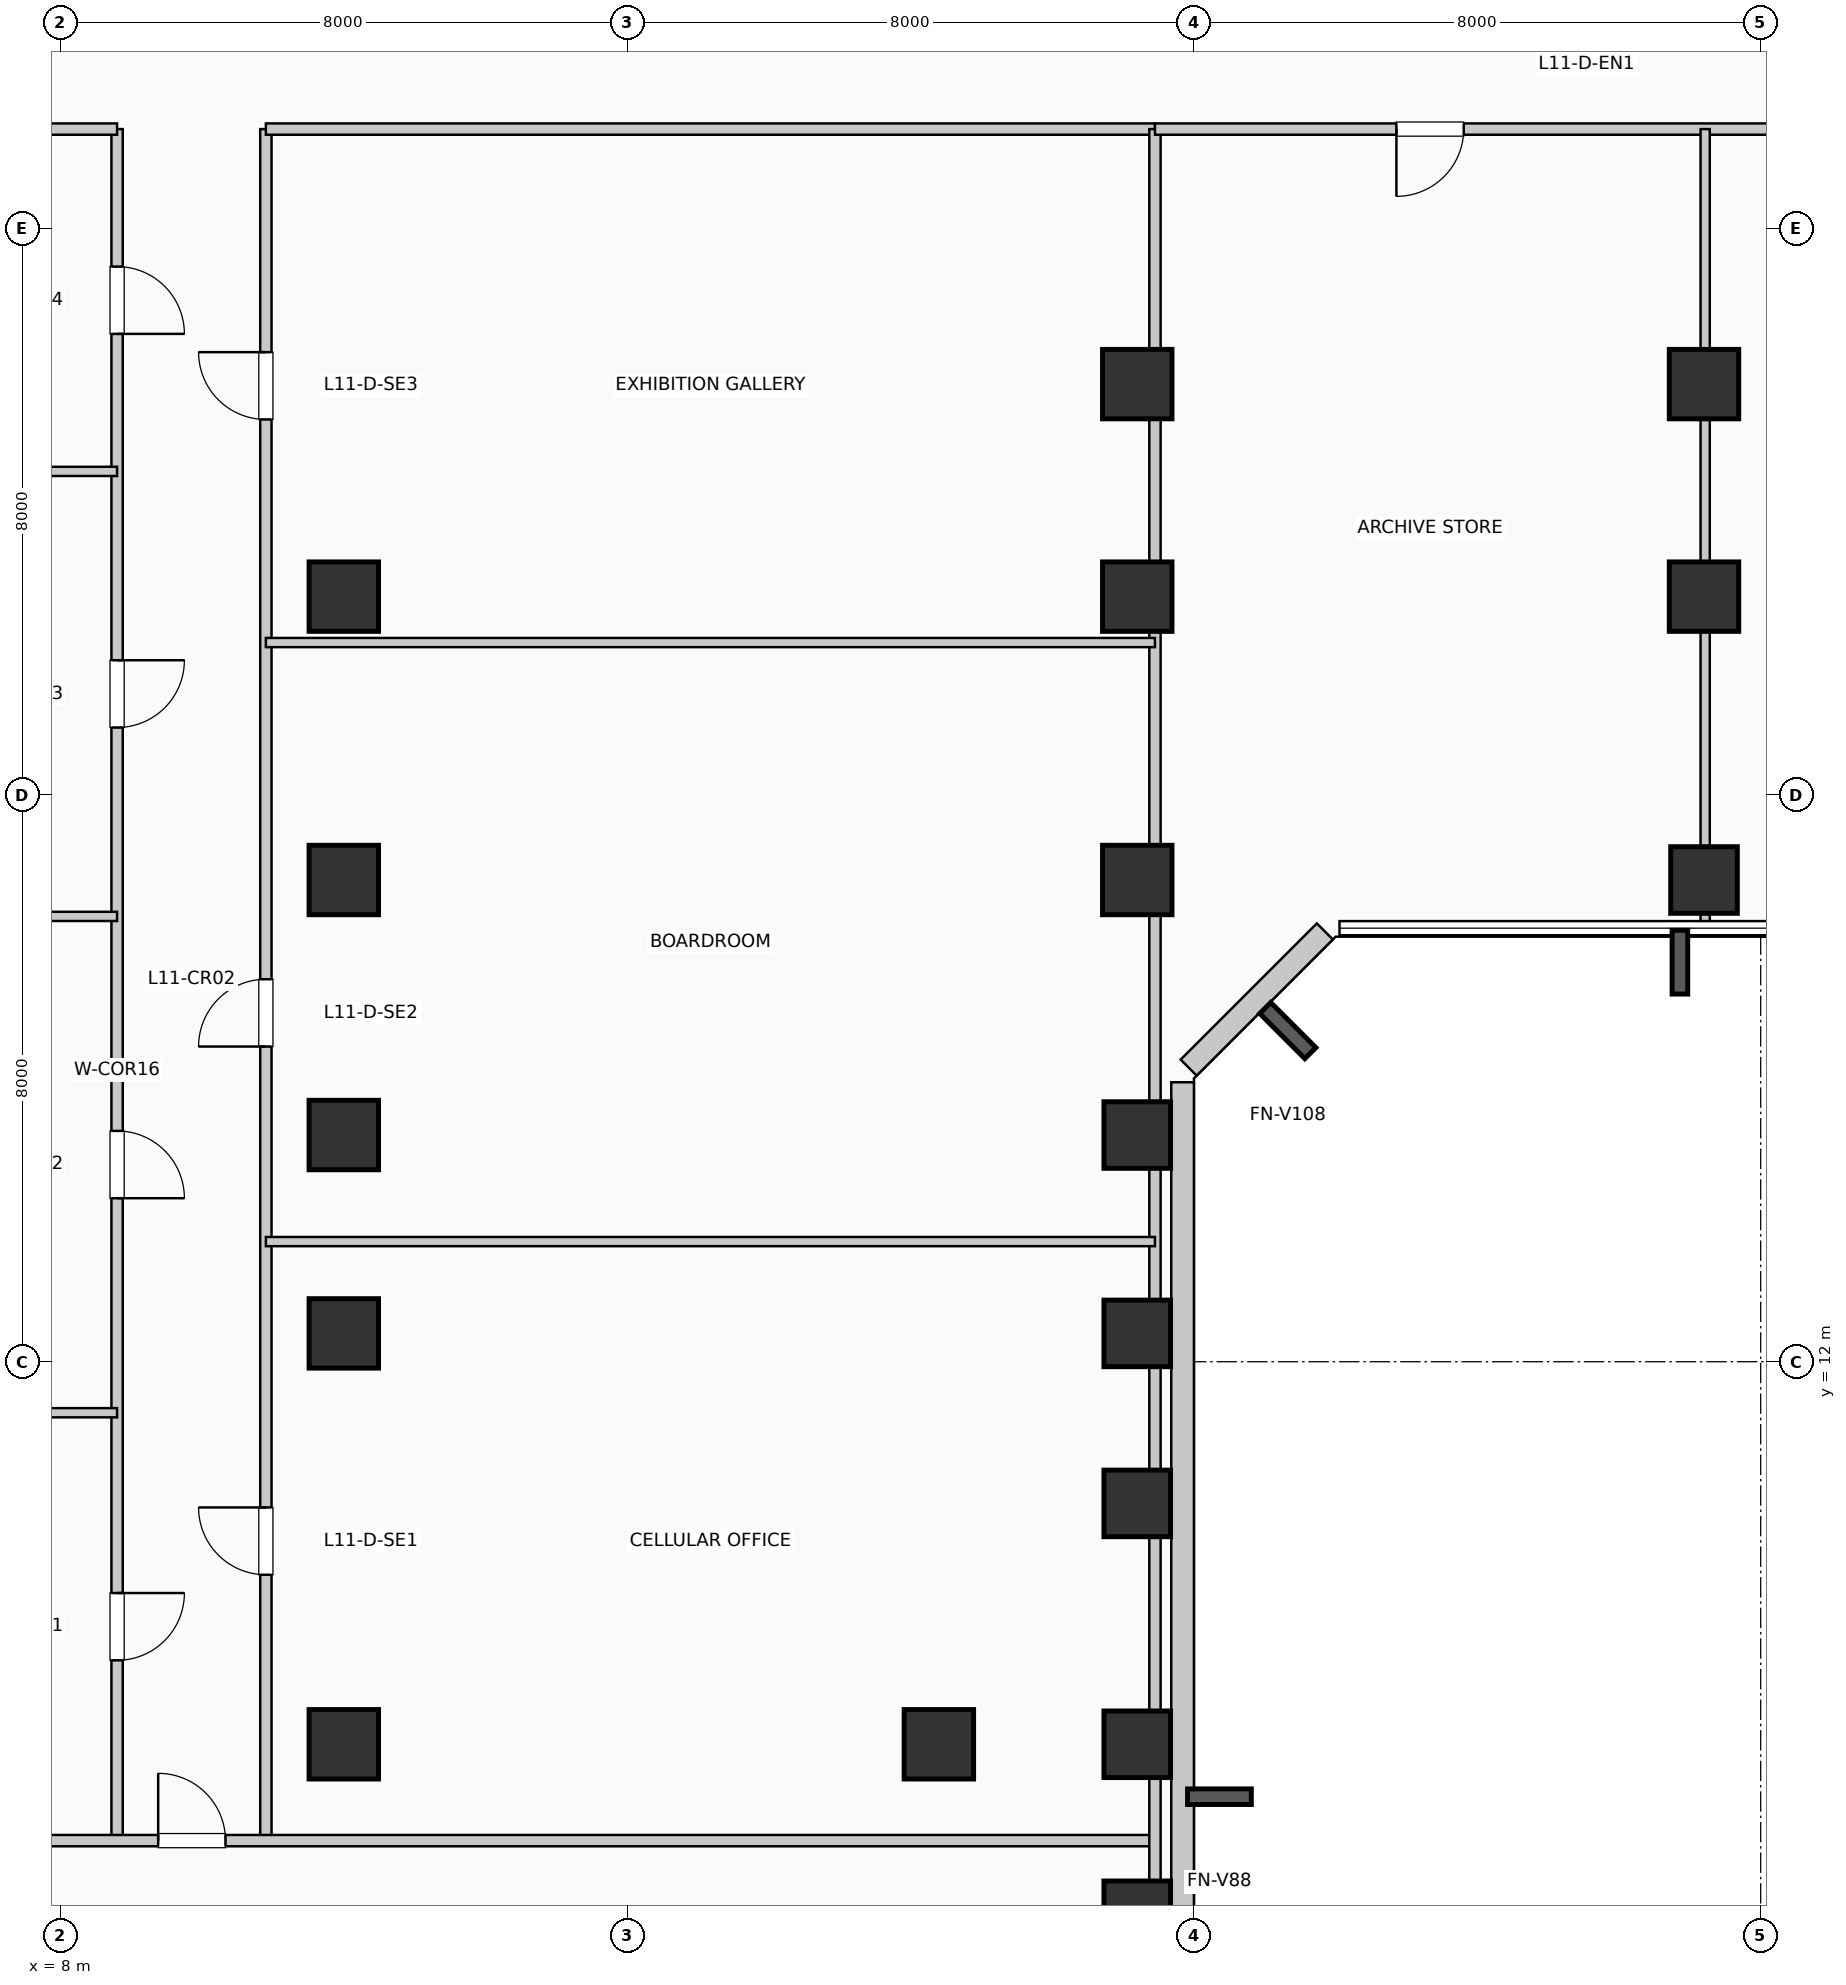
"""IFC4 building model, lengths in metres.
Left out: names, types, materials, properties, quantities, classifications, styles, units other than length and angle.
Written with IfcOpenShell. Run it as: python <this file> out.ifc"""

import sys

from ifc_helpers import new_model, si_unit, direction, frame, frame_2d, origin, origin_2d, place, context, subcontext, project, spatial, rectangle, extrude, element, fill, save


model = new_model("IFC4")
c1 = context("Model", 3, precision=1e-05, world=origin(), true_north=direction((0.0, 1.0)))
c2 = subcontext(c1, "Body", "Model", "MODEL_VIEW")
j1 = project(units=[si_unit("LENGTHUNIT", "METRE"), si_unit("PLANEANGLEUNIT", "RADIAN")], contexts=[c1])
p1 = place(None, origin())
s1 = spatial("IfcSite", under=j1, at=p1, CompositionType="ELEMENT")
p2 = place(p1, origin())
s2 = spatial("IfcBuilding", under=s1, at=p2, CompositionType="ELEMENT")
p3 = place(p2, frame((0.0, 0.0, 50.16)))
s3 = spatial("IfcBuildingStorey", under=s2, at=p3, CompositionType="ELEMENT", Elevation=50.16)
for number, where, z_axis, x_axis in (
    (1, (12.0, 6.6, 0.0), (0.0, 0.0, 1.0), (1.0, 0.0, 0.0)),
    (2, (12.0, 12.4, 0.0), (0.0, 0.0, 1.0), (1.0, 0.0, 0.0)),
    (3, (12.0, 15.2, 0.0), (0.0, 0.0, 1.0), (1.0, 0.0, 0.0)),
    (4, (12.0, 18.8, 0.0), (0.0, 0.0, 1.0), (1.0, 0.0, 0.0)),
    (5, (12.0, 22.8, 0.0), (0.0, 0.0, 1.0), (1.0, 0.0, 0.0)),
    (6, (20.4, 6.6, 0.0), (0.0, 0.0, 1.0), (1.0, 0.0, 0.0)),
):
    element("IfcColumn", number, at=place(p3, frame(where, z_axis=z_axis, x_axis=x_axis)), inside=s3, PredefinedType="COLUMN", context=c2, shape_type="SweptSolid", body=[
        extrude(rectangle(XDim=0.98, YDim=0.98, at=origin_2d()), origin(), (0.0, 0.0, 1.0), 3.96),
    ])
for number, where, z_axis, x_axis in (
    (7, (23.2, 4.2, 0.0), (0.0, 0.0, 1.0), (1.0, 0.0, 0.0)),
    (8, (23.2, 6.6, 0.0), (0.0, 0.0, 1.0), (1.0, 0.0, 0.0)),
    (9, (23.2, 10.0, 0.0), (0.0, 0.0, 1.0), (1.0, 0.0, 0.0)),
    (10, (23.2, 12.4, 0.0), (0.0, 0.0, 1.0), (1.0, 0.0, 0.0)),
    (11, (23.2, 15.2, 0.0), (0.0, 0.0, 1.0), (1.0, 0.0, 0.0)),
):
    element("IfcColumn", number, at=place(p3, frame(where, z_axis=z_axis, x_axis=x_axis)), inside=s3, PredefinedType="COLUMN", context=c2, shape_type="SweptSolid", body=[
        extrude(rectangle(XDim=0.94, YDim=0.94, at=origin_2d()), origin(), (0.0, 0.0, 1.0), 3.96),
    ])
for number, where, z_axis, x_axis in (
    (12, (23.2, 18.8, 0.0), (0.0, 0.0, 1.0), (1.0, 0.0, 0.0)),
    (13, (23.2, 22.8, 0.0), (0.0, 0.0, 1.0), (1.0, 0.0, 0.0)),
    (14, (23.2, 25.8, 0.0), (0.0, 0.0, 1.0), (1.0, 0.0, 0.0)),
):
    element("IfcColumn", number, at=place(p3, frame(where, z_axis=z_axis, x_axis=x_axis)), inside=s3, PredefinedType="COLUMN", context=c2, shape_type="SweptSolid", body=[
        extrude(rectangle(XDim=0.98, YDim=0.98, at=origin_2d()), origin(), (0.0, 0.0, 1.0), 3.96),
    ])
p4 = place(p3, frame((31.2, 18.8, 0.0), z_axis=(0.0, 0.0, 1.0), x_axis=(1.0, 0.0, 0.0)))
e15 = element("IfcColumn", 15, at=p4, inside=s3, PredefinedType="COLUMN", context=c2, shape_type="SweptSolid", body=[
    extrude(rectangle(XDim=0.94, YDim=0.94, at=origin_2d()), origin(), (0.0, 0.0, 1.0), 3.96),
])
for number, where, z_axis, x_axis in (
    (16, (31.2, 22.8, 0.0), (0.0, 0.0, 1.0), (1.0, 0.0, 0.0)),
    (17, (31.2, 25.8, 0.0), (0.0, 0.0, 1.0), (1.0, 0.0, 0.0)),
):
    element("IfcColumn", number, at=place(p3, frame(where, z_axis=z_axis, x_axis=x_axis)), inside=s3, PredefinedType="COLUMN", context=c2, shape_type="SweptSolid", body=[
        extrude(rectangle(XDim=0.98, YDim=0.98, at=origin_2d()), origin(), (0.0, 0.0, 1.0), 3.96),
    ])
p5 = place(p3, frame((23.84, 3.055, 0.0), z_axis=(0.0, 0.0, 1.0), x_axis=(0.0, 1.0, 0.0)))
e18 = element("IfcWall", 18, at=p5, inside=s3, PredefinedType="SOLIDWALL", context=c2, shape_type="SweptSolid", body=[
    extrude(rectangle(XDim=12.89, YDim=0.32, at=frame_2d((6.445, 0.0))), origin(), (0.0, 0.0, 1.0), 3.71),
])
p6 = place(p3, frame((23.926, 16.152, 0.0), z_axis=(0.0, 0.0, 1.0), x_axis=(0.707106781187, 0.707106781187, 0.0)))
e19 = element("IfcWall", 19, at=p6, inside=s3, PredefinedType="SOLIDWALL", context=c2, shape_type="SweptSolid", body=[
    extrude(rectangle(XDim=2.718, YDim=0.32, at=frame_2d((1.359, 0.0))), origin(), (0.0, 0.0, 1.0), 3.71),
])
p7 = place(p3, frame((8.8, 5.24, 0.0), z_axis=(0.0, 0.0, 1.0), x_axis=(0.0, 1.0, 0.0)))
e20 = element("IfcWall", 20, at=p7, inside=s3, PredefinedType="PARTITIONING", context=c2, shape_type="SweptSolid", body=[
    extrude(rectangle(XDim=24.16, YDim=0.16, at=frame_2d((12.08, 0.0))), origin(), (0.0, 0.0, 1.0), 3.71),
])
p8 = place(p7, frame((3.495, 0.0, 0.0), z_axis=(0.0, 0.0, 1.0), x_axis=(-1.0, 0.0, 0.0)))
e21 = element("IfcOpeningElement", 21, at=p8, cuts=e20, PredefinedType="OPENING", context=c2, shape_type="SweptSolid", body=[
    extrude(rectangle(XDim=0.95, YDim=2.15, at=frame_2d((0.475, 1.075))), frame((0.0, 0.09, 0.0), z_axis=(0.0, -1.0, 0.0), x_axis=(1.0, 0.0, 0.0)), (0.0, 0.0, 1.0), 0.18),
])
p9 = place(p7, frame((10.018, 0.0, 0.0), z_axis=(0.0, 0.0, 1.0), x_axis=(-1.0, 0.0, 0.0)))
e22 = element("IfcOpeningElement", 22, at=p9, cuts=e20, PredefinedType="OPENING", context=c2, shape_type="SweptSolid", body=[
    extrude(rectangle(XDim=0.95, YDim=2.15, at=frame_2d((0.475, 1.075))), frame((0.0, 0.09, 0.0), z_axis=(0.0, -1.0, 0.0), x_axis=(1.0, 0.0, 0.0)), (0.0, 0.0, 1.0), 0.18),
])
p10 = place(p7, frame((16.662, 0.0, 0.0), z_axis=(0.0, 0.0, 1.0), x_axis=(-1.0, 0.0, 0.0)))
e23 = element("IfcOpeningElement", 23, at=p10, cuts=e20, PredefinedType="OPENING", context=c2, shape_type="SweptSolid", body=[
    extrude(rectangle(XDim=0.95, YDim=2.15, at=frame_2d((0.475, 1.075))), frame((0.0, 0.09, 0.0), z_axis=(0.0, -1.0, 0.0), x_axis=(1.0, 0.0, 0.0)), (0.0, 0.0, 1.0), 0.18),
])
p11 = place(p7, frame((22.219, 0.0, 0.0), z_axis=(0.0, 0.0, 1.0), x_axis=(-1.0, 0.0, 0.0)))
e24 = element("IfcOpeningElement", 24, at=p11, cuts=e20, PredefinedType="OPENING", context=c2, shape_type="SweptSolid", body=[
    extrude(rectangle(XDim=0.95, YDim=2.15, at=frame_2d((0.475, 1.075))), frame((0.0, 0.09, 0.0), z_axis=(0.0, -1.0, 0.0), x_axis=(1.0, 0.0, 0.0)), (0.0, 0.0, 1.0), 0.18),
])
p12 = place(p3, frame((10.9, 5.24, 0.0), z_axis=(0.0, 0.0, 1.0), x_axis=(0.0, 1.0, 0.0)))
e25 = element("IfcWall", 25, at=p12, inside=s3, PredefinedType="PARTITIONING", context=c2, shape_type="SweptSolid", body=[
    extrude(rectangle(XDim=24.16, YDim=0.16, at=frame_2d((12.08, 0.0))), origin(), (0.0, 0.0, 1.0), 3.71),
])
p13 = place(p12, frame((3.753, 0.0, 0.0)))
e26 = element("IfcOpeningElement", 26, at=p13, cuts=e25, PredefinedType="OPENING", context=c2, shape_type="SweptSolid", body=[
    extrude(rectangle(XDim=0.95, YDim=2.15, at=frame_2d((0.475, 1.075))), frame((0.0, 0.09, 0.0), z_axis=(0.0, -1.0, 0.0), x_axis=(1.0, 0.0, 0.0)), (0.0, 0.0, 1.0), 0.18),
])
p14 = place(p12, frame((11.209, 0.0, 0.0)))
e27 = element("IfcOpeningElement", 27, at=p14, cuts=e25, PredefinedType="OPENING", context=c2, shape_type="SweptSolid", body=[
    extrude(rectangle(XDim=0.95, YDim=2.15, at=frame_2d((0.475, 1.075))), frame((0.0, 0.09, 0.0), z_axis=(0.0, -1.0, 0.0), x_axis=(1.0, 0.0, 0.0)), (0.0, 0.0, 1.0), 0.18),
])
p15 = place(p12, frame((20.061, 0.0, 0.0)))
e28 = element("IfcOpeningElement", 28, at=p15, cuts=e25, PredefinedType="OPENING", context=c2, shape_type="SweptSolid", body=[
    extrude(rectangle(XDim=0.95, YDim=2.15, at=frame_2d((0.475, 1.075))), frame((0.0, 0.09, 0.0), z_axis=(0.0, -1.0, 0.0), x_axis=(1.0, 0.0, 0.0)), (0.0, 0.0, 1.0), 0.18),
])
p16 = place(p3, frame((0.19, 5.24, 0.0), z_axis=(0.0, 0.0, 1.0), x_axis=(1.0, 0.0, 0.0)))
e29 = element("IfcWall", 29, at=p16, inside=s3, PredefinedType="PARTITIONING", context=c2, shape_type="SweptSolid", body=[
    extrude(rectangle(XDim=23.26, YDim=0.16, at=frame_2d((11.63, 0.0))), origin(), (0.0, 0.0, 1.0), 3.71),
])
p17 = place(p16, frame((9.19, 0.0, 0.0)))
e30 = element("IfcOpeningElement", 30, at=p17, cuts=e29, PredefinedType="OPENING", context=c2, shape_type="SweptSolid", body=[
    extrude(rectangle(XDim=0.95, YDim=2.15, at=frame_2d((0.475, 1.075))), frame((0.0, 0.09, 0.0), z_axis=(0.0, -1.0, 0.0), x_axis=(1.0, 0.0, 0.0)), (0.0, 0.0, 1.0), 0.18),
])
p18 = place(p3, frame((0.19, 29.4, 0.0), z_axis=(0.0, 0.0, 1.0), x_axis=(1.0, 0.0, 0.0)))
e31 = element("IfcWall", 31, at=p18, inside=s3, PredefinedType="PARTITIONING", context=c2, shape_type="SweptSolid", body=[
    extrude(rectangle(XDim=8.61, YDim=0.16, at=frame_2d((4.305, 0.0))), origin(), (0.0, 0.0, 1.0), 3.365),
])
p19 = place(p3, frame((10.9, 29.4, 0.0), z_axis=(0.0, 0.0, 1.0), x_axis=(1.0, 0.0, 0.0)))
e32 = element("IfcWall", 32, at=p19, inside=s3, PredefinedType="PARTITIONING", context=c2, shape_type="SweptSolid", body=[
    extrude(rectangle(XDim=12.55, YDim=0.16, at=frame_2d((6.275, 0.0))), origin(), (0.0, 0.0, 1.0), 3.365),
])
p20 = place(p3, frame((23.45, 1.04, 0.0), z_axis=(0.0, 0.0, 1.0), x_axis=(0.0, 1.0, 0.0)))
e33 = element("IfcWall", 33, at=p20, inside=s3, PredefinedType="PARTITIONING", context=c2, shape_type="SweptSolid", body=[
    extrude(rectangle(XDim=28.36, YDim=0.16, at=frame_2d((14.18, 0.0))), origin(), (0.0, 0.0, 1.0), 2.995),
])
for number, where, z_axis, x_axis in (
    (34, (0.19, 11.28, 0.0), (0.0, 0.0, 1.0), (1.0, 0.0, 0.0)),
    (35, (0.19, 18.286, 0.0), (0.0, 0.0, 1.0), (1.0, 0.0, 0.0)),
    (36, (0.19, 24.568, 0.0), (0.0, 0.0, 1.0), (1.0, 0.0, 0.0)),
):
    element("IfcWall", number, at=place(p3, frame(where, z_axis=z_axis, x_axis=x_axis)), inside=s3, PredefinedType="PARTITIONING", context=c2, shape_type="SweptSolid", body=[
        extrude(rectangle(XDim=8.61, YDim=0.13, at=frame_2d((4.305, 0.0))), origin(), (0.0, 0.0, 1.0), 3.71),
    ])
for number, where, z_axis, x_axis in (
    (37, (10.9, 13.696, 0.0), (0.0, 0.0, 1.0), (1.0, 0.0, 0.0)),
    (38, (10.9, 22.152, 0.0), (0.0, 0.0, 1.0), (1.0, 0.0, 0.0)),
):
    element("IfcWall", number, at=place(p3, frame(where, z_axis=z_axis, x_axis=x_axis)), inside=s3, PredefinedType="PARTITIONING", context=c2, shape_type="SweptSolid", body=[
        extrude(rectangle(XDim=12.55, YDim=0.13, at=frame_2d((6.275, 0.0))), origin(), (0.0, 0.0, 1.0), 3.71),
    ])
p21 = place(p3, frame((23.45, 29.4, 0.0), z_axis=(0.0, 0.0, 1.0), x_axis=(1.0, 0.0, 0.0)))
e39 = element("IfcWall", 39, at=p21, inside=s3, PredefinedType="PARTITIONING", context=c2, shape_type="SweptSolid", body=[
    extrude(rectangle(XDim=32.36, YDim=0.16, at=frame_2d((16.18, 0.0))), origin(), (0.0, 0.0, 1.0), 3.365),
])
p22 = place(p21, frame((4.358, 0.0, 0.0), z_axis=(0.0, 0.0, 1.0), x_axis=(-1.0, 0.0, 0.0)))
e40 = element("IfcOpeningElement", 40, at=p22, cuts=e39, PredefinedType="OPENING", context=c2, shape_type="SweptSolid", body=[
    extrude(rectangle(XDim=0.95, YDim=2.15, at=frame_2d((0.475, 1.075))), frame((0.0, 0.09, 0.0), z_axis=(0.0, -1.0, 0.0), x_axis=(1.0, 0.0, 0.0)), (0.0, 0.0, 1.0), 0.18),
])
p23 = place(p21, frame((12.772, 0.0, 0.0), z_axis=(0.0, 0.0, 1.0), x_axis=(-1.0, 0.0, 0.0)))
e41 = element("IfcOpeningElement", 41, at=p23, cuts=e39, PredefinedType="OPENING", context=c2, shape_type="SweptSolid", body=[
    extrude(rectangle(XDim=0.95, YDim=2.15, at=frame_2d((0.475, 1.075))), frame((0.0, 0.09, 0.0), z_axis=(0.0, -1.0, 0.0), x_axis=(1.0, 0.0, 0.0)), (0.0, 0.0, 1.0), 0.18),
])
p24 = place(p21, frame((21.509, 0.0, 0.0), z_axis=(0.0, 0.0, 1.0), x_axis=(-1.0, 0.0, 0.0)))
e42 = element("IfcOpeningElement", 42, at=p24, cuts=e39, PredefinedType="OPENING", context=c2, shape_type="SweptSolid", body=[
    extrude(rectangle(XDim=0.95, YDim=2.15, at=frame_2d((0.475, 1.075))), frame((0.0, 0.09, 0.0), z_axis=(0.0, -1.0, 0.0), x_axis=(1.0, 0.0, 0.0)), (0.0, 0.0, 1.0), 0.18),
])
p25 = place(p21, frame((29.275, 0.0, 0.0), z_axis=(0.0, 0.0, 1.0), x_axis=(-1.0, 0.0, 0.0)))
e43 = element("IfcOpeningElement", 43, at=p25, cuts=e39, PredefinedType="OPENING", context=c2, shape_type="SweptSolid", body=[
    extrude(rectangle(XDim=0.95, YDim=2.15, at=frame_2d((0.475, 1.075))), frame((0.0, 0.09, 0.0), z_axis=(0.0, -1.0, 0.0), x_axis=(1.0, 0.0, 0.0)), (0.0, 0.0, 1.0), 0.18),
])
p26 = place(p3, frame((31.216, 18.19, 0.0), z_axis=(0.0, 0.0, 1.0), x_axis=(0.0, 1.0, 0.0)))
e44 = element("IfcWall", 44, at=p26, inside=s3, PredefinedType="PARTITIONING", context=c2, shape_type="SweptSolid", body=[
    extrude(rectangle(XDim=11.21, YDim=0.13, at=frame_2d((5.605, 0.0))), origin(), (0.0, 0.0, 1.0), 2.995),
])
p27 = place(p17, origin())
e45 = element("IfcDoor", 45, at=p27, inside=s3, OperationType="SINGLE_SWING_LEFT", PredefinedType="DOOR", context=c2, shape_type="SweptSolid", body=[
    extrude(rectangle(XDim=0.95, YDim=2.15, at=frame_2d((0.475, 1.075))), frame((0.0, 0.025, 0.0), z_axis=(0.0, -1.0, 0.0), x_axis=(1.0, 0.0, 0.0)), (0.0, 0.0, 1.0), 0.05),
])
fill(e30, e45)
p28 = place(p8, origin())
e46 = element("IfcDoor", 46, at=p28, inside=s3, OperationType="SINGLE_SWING_RIGHT", PredefinedType="DOOR", context=c2, shape_type="SweptSolid", body=[
    extrude(rectangle(XDim=0.95, YDim=2.15, at=frame_2d((0.475, 1.075))), frame((0.0, 0.025, 0.0), z_axis=(0.0, -1.0, 0.0), x_axis=(1.0, 0.0, 0.0)), (0.0, 0.0, 1.0), 0.05),
])
fill(e21, e46)
p29 = place(p9, origin())
e47 = element("IfcDoor", 47, at=p29, inside=s3, OperationType="SINGLE_SWING_LEFT", PredefinedType="DOOR", context=c2, shape_type="SweptSolid", body=[
    extrude(rectangle(XDim=0.95, YDim=2.15, at=frame_2d((0.475, 1.075))), frame((0.0, 0.025, 0.0), z_axis=(0.0, -1.0, 0.0), x_axis=(1.0, 0.0, 0.0)), (0.0, 0.0, 1.0), 0.05),
])
fill(e22, e47)
p30 = place(p10, origin())
e48 = element("IfcDoor", 48, at=p30, inside=s3, OperationType="SINGLE_SWING_RIGHT", PredefinedType="DOOR", context=c2, shape_type="SweptSolid", body=[
    extrude(rectangle(XDim=0.95, YDim=2.15, at=frame_2d((0.475, 1.075))), frame((0.0, 0.025, 0.0), z_axis=(0.0, -1.0, 0.0), x_axis=(1.0, 0.0, 0.0)), (0.0, 0.0, 1.0), 0.05),
])
fill(e23, e48)
p31 = place(p11, origin())
e49 = element("IfcDoor", 49, at=p31, inside=s3, OperationType="SINGLE_SWING_LEFT", PredefinedType="DOOR", context=c2, shape_type="SweptSolid", body=[
    extrude(rectangle(XDim=0.95, YDim=2.15, at=frame_2d((0.475, 1.075))), frame((0.0, 0.025, 0.0), z_axis=(0.0, -1.0, 0.0), x_axis=(1.0, 0.0, 0.0)), (0.0, 0.0, 1.0), 0.05),
])
fill(e24, e49)
p32 = place(p13, origin())
e50 = element("IfcDoor", 50, at=p32, inside=s3, OperationType="SINGLE_SWING_RIGHT", PredefinedType="DOOR", context=c2, shape_type="SweptSolid", body=[
    extrude(rectangle(XDim=0.95, YDim=2.15, at=frame_2d((0.475, 1.075))), frame((0.0, 0.025, 0.0), z_axis=(0.0, -1.0, 0.0), x_axis=(1.0, 0.0, 0.0)), (0.0, 0.0, 1.0), 0.05),
])
fill(e26, e50)
p33 = place(p14, origin())
e51 = element("IfcDoor", 51, at=p33, inside=s3, OperationType="SINGLE_SWING_LEFT", PredefinedType="DOOR", context=c2, shape_type="SweptSolid", body=[
    extrude(rectangle(XDim=0.95, YDim=2.15, at=frame_2d((0.475, 1.075))), frame((0.0, 0.025, 0.0), z_axis=(0.0, -1.0, 0.0), x_axis=(1.0, 0.0, 0.0)), (0.0, 0.0, 1.0), 0.05),
])
fill(e27, e51)
p34 = place(p15, origin())
e52 = element("IfcDoor", 52, at=p34, inside=s3, OperationType="SINGLE_SWING_RIGHT", PredefinedType="DOOR", context=c2, shape_type="SweptSolid", body=[
    extrude(rectangle(XDim=0.95, YDim=2.15, at=frame_2d((0.475, 1.075))), frame((0.0, 0.025, 0.0), z_axis=(0.0, -1.0, 0.0), x_axis=(1.0, 0.0, 0.0)), (0.0, 0.0, 1.0), 0.05),
])
fill(e28, e52)
p35 = place(p22, origin())
e53 = element("IfcDoor", 53, at=p35, inside=s3, OperationType="SINGLE_SWING_LEFT", PredefinedType="DOOR", context=c2, shape_type="SweptSolid", body=[
    extrude(rectangle(XDim=0.95, YDim=2.15, at=frame_2d((0.475, 1.075))), frame((0.0, 0.025, 0.0), z_axis=(0.0, -1.0, 0.0), x_axis=(1.0, 0.0, 0.0)), (0.0, 0.0, 1.0), 0.05),
])
fill(e40, e53)
save(model, sys.argv[1])
